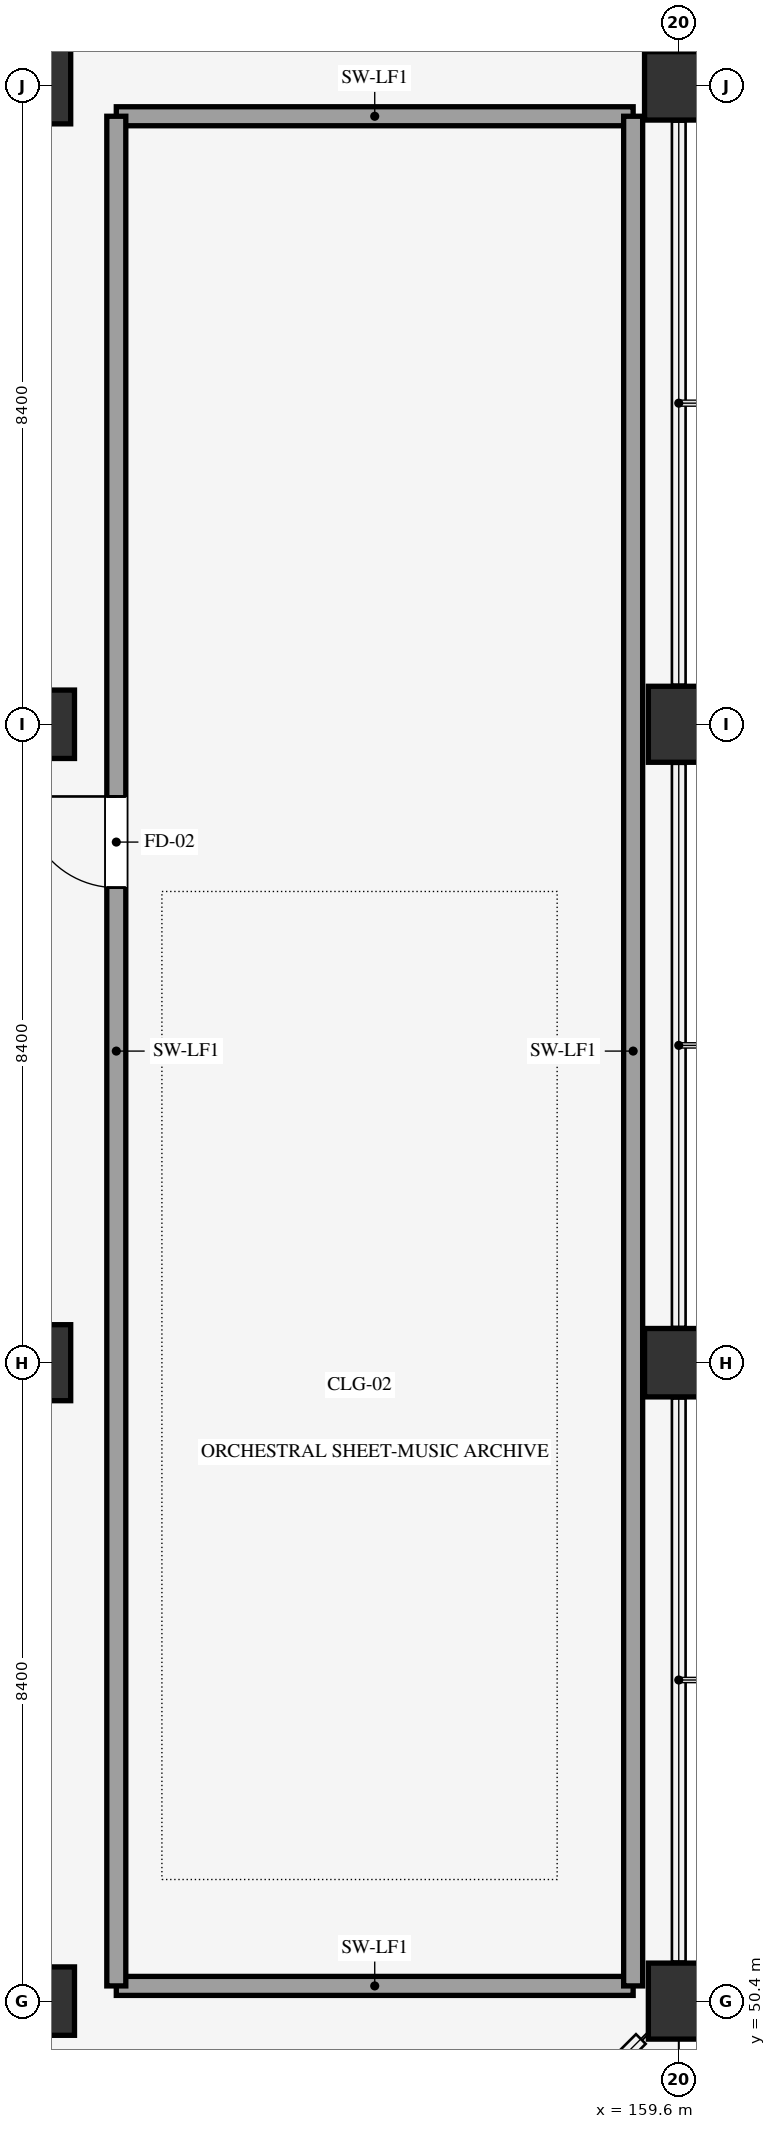
"""IFC4 building model, lengths in metres.
Left out: names, types, materials, properties, quantities, classifications, styles, units other than length and angle.
Written with IfcOpenShell. Run it as: python <this file> out.ifc"""

import sys

from ifc_helpers import new_model, si_unit, direction, frame, frame_2d, origin, origin_2d, place, context, subcontext, project, spatial, rectangle, extrude, element, fill, save


model = new_model("IFC4")
c1 = context("Model", 3, precision=1e-05, world=origin(), true_north=direction((0.0, 1.0)))
c2 = subcontext(c1, "Body", "Model", "MODEL_VIEW")
j1 = project(units=[si_unit("LENGTHUNIT", "METRE"), si_unit("PLANEANGLEUNIT", "RADIAN")], contexts=[c1])
p1 = place(None, origin())
s1 = spatial("IfcSite", under=j1, at=p1, CompositionType="ELEMENT")
p2 = place(p1, origin())
s2 = spatial("IfcBuilding", under=s1, at=p2, CompositionType="ELEMENT")
p3 = place(p2, frame((0.0, 0.0, 57.3)))
s3 = spatial("IfcBuildingStorey", under=s2, at=p3, CompositionType="ELEMENT", Elevation=57.3)
p4 = place(p3, frame((151.2, 50.4, 0.0), z_axis=(0.0, 0.0, 1.0), x_axis=(1.0, 0.0, 0.0)))
e1 = element("IfcColumn", 1, at=p4, inside=s3, PredefinedType="COLUMN", context=c2, shape_type="SweptSolid", body=[
    extrude(rectangle(XDim=0.9, YDim=0.9, at=origin_2d()), origin(), (0.0, 0.0, 1.0), 4.2),
])
p5 = place(p3, frame((151.2, 58.8, 0.0), z_axis=(0.0, 0.0, 1.0), x_axis=(1.0, 0.0, 0.0)))
e2 = element("IfcColumn", 2, at=p5, inside=s3, PredefinedType="COLUMN", context=c2, shape_type="SweptSolid", body=[
    extrude(rectangle(XDim=0.8, YDim=1.0, at=origin_2d()), origin(), (0.0, 0.0, 1.0), 4.2),
])
p6 = place(p3, frame((151.2, 67.2, 0.0), z_axis=(0.0, 0.0, 1.0), x_axis=(1.0, 0.0, 0.0)))
e3 = element("IfcColumn", 3, at=p6, inside=s3, PredefinedType="COLUMN", context=c2, shape_type="SweptSolid", body=[
    extrude(rectangle(XDim=0.9, YDim=0.9, at=origin_2d()), origin(), (0.0, 0.0, 1.0), 4.2),
])
for number, where, z_axis, x_axis in (
    (4, (151.2, 75.6, 0.0), (0.0, 0.0, 1.0), (1.0, 0.0, 0.0)),
    (5, (159.6, 50.4, 0.0), (0.0, 0.0, 1.0), (1.0, 0.0, 0.0)),
):
    element("IfcColumn", number, at=place(p3, frame(where, z_axis=z_axis, x_axis=x_axis)), inside=s3, PredefinedType="COLUMN", context=c2, shape_type="SweptSolid", body=[
        extrude(rectangle(XDim=0.8, YDim=1.0, at=origin_2d()), origin(), (0.0, 0.0, 1.0), 4.2),
    ])
p7 = place(p3, frame((159.6, 58.8, 0.0), z_axis=(0.0, 0.0, 1.0), x_axis=(1.0, 0.0, 0.0)))
e6 = element("IfcColumn", 6, at=p7, inside=s3, PredefinedType="COLUMN", context=c2, shape_type="SweptSolid", body=[
    extrude(rectangle(XDim=0.9, YDim=0.9, at=origin_2d()), origin(), (0.0, 0.0, 1.0), 4.2),
])
p8 = place(p3, frame((159.6, 67.2, 0.0), z_axis=(0.0, 0.0, 1.0), x_axis=(1.0, 0.0, 0.0)))
e7 = element("IfcColumn", 7, at=p8, inside=s3, PredefinedType="COLUMN", context=c2, shape_type="SweptSolid", body=[
    extrude(rectangle(XDim=0.8, YDim=1.0, at=origin_2d()), origin(), (0.0, 0.0, 1.0), 4.2),
])
p9 = place(p3, frame((159.6, 75.6, 0.0), z_axis=(0.0, 0.0, 1.0), x_axis=(1.0, 0.0, 0.0)))
e8 = element("IfcColumn", 8, at=p9, inside=s3, PredefinedType="COLUMN", context=c2, shape_type="SweptSolid", body=[
    extrude(rectangle(XDim=0.9, YDim=0.9, at=origin_2d()), origin(), (0.0, 0.0, 1.0), 4.2),
])
for number, where, z_axis, x_axis in (
    (9, (152.2, 50.6, 0.0), (0.0, 0.0, 1.0), (1.0, 0.0, 0.0)),
    (10, (152.2, 75.2, 0.0), (0.0, 0.0, 1.0), (1.0, 0.0, 0.0)),
):
    element("IfcWall", number, at=place(p3, frame(where, z_axis=z_axis, x_axis=x_axis)), inside=s3, PredefinedType="SHEAR", context=c2, shape_type="SweptSolid", body=[
        extrude(rectangle(XDim=6.8, YDim=0.25, at=frame_2d((3.4, 0.0))), origin(), (0.0, 0.0, 1.0), 3.96),
    ])
p10 = place(p3, frame((152.2, 50.6, 0.0), z_axis=(0.0, 0.0, 1.0), x_axis=(0.0, 1.0, 0.0)))
e11 = element("IfcWall", 11, at=p10, inside=s3, PredefinedType="SHEAR", context=c2, shape_type="SweptSolid", body=[
    extrude(rectangle(XDim=24.6, YDim=0.25, at=frame_2d((12.3, 0.0))), origin(), (0.0, 0.0, 1.0), 3.96),
])
p11 = place(p10, frame((14.45, 0.0, 0.0)))
e12 = element("IfcOpeningElement", 12, at=p11, cuts=e11, PredefinedType="OPENING", context=c2, shape_type="SweptSolid", body=[
    extrude(rectangle(XDim=1.2, YDim=2.15, at=frame_2d((0.6, 1.075))), frame((0.0, 0.135, 0.0), z_axis=(0.0, -1.0, 0.0), x_axis=(1.0, 0.0, 0.0)), (0.0, 0.0, 1.0), 0.27),
])
p12 = place(p3, frame((159.0, 50.6, 0.0), z_axis=(0.0, 0.0, 1.0), x_axis=(0.0, 1.0, 0.0)))
e13 = element("IfcWall", 13, at=p12, inside=s3, PredefinedType="SHEAR", context=c2, shape_type="SweptSolid", body=[
    extrude(rectangle(XDim=24.6, YDim=0.25, at=frame_2d((12.3, 0.0))), origin(), (0.0, 0.0, 1.0), 3.96),
])
p13 = place(p11, origin())
e14 = element("IfcDoor", 14, at=p13, inside=s3, OperationType="SINGLE_SWING_RIGHT", PredefinedType="DOOR", context=c2, shape_type="SweptSolid", body=[
    extrude(rectangle(XDim=1.2, YDim=2.15, at=frame_2d((0.6, 1.075))), frame((0.0, 0.025, 0.0), z_axis=(0.0, -1.0, 0.0), x_axis=(1.0, 0.0, 0.0)), (0.0, 0.0, 1.0), 0.05),
])
fill(e12, e14)
save(model, sys.argv[1])
